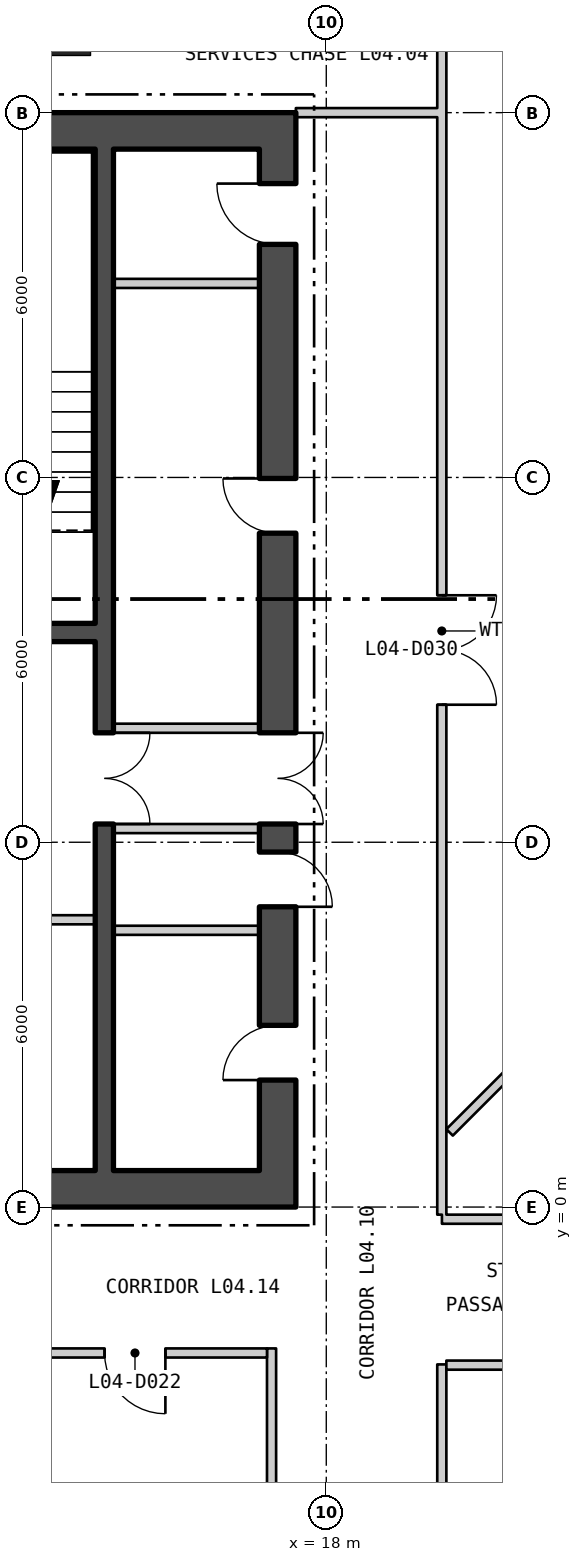
"""IFC4 building model, lengths in metres.
Left out: names, types, materials, properties, quantities, classifications, styles, units other than length and angle.
Written with IfcOpenShell. Run it as: python <this file> out.ifc"""

import sys

from ifc_helpers import new_model, si_unit, direction, frame, frame_2d, origin, origin_2d, place, context, subcontext, project, spatial, rectangle, hollow_rectangle, extrude, element, fill, save


model = new_model("IFC4")
c1 = context("Model", 3, precision=1e-05, world=origin(), true_north=direction((0.0, 1.0)))
c2 = subcontext(c1, "Body", "Model", "MODEL_VIEW")
j1 = project(units=[si_unit("LENGTHUNIT", "METRE"), si_unit("PLANEANGLEUNIT", "RADIAN")], contexts=[c1])
p1 = place(None, origin())
s1 = spatial("IfcSite", under=j1, at=p1, CompositionType="ELEMENT")
p2 = place(p1, origin())
s2 = spatial("IfcBuilding", under=s1, at=p2, CompositionType="ELEMENT")
p3 = place(p2, frame((0.0, 0.0, 23.7)))
s3 = spatial("IfcBuildingStorey", under=s2, at=p3, CompositionType="ELEMENT", Elevation=23.7)
p4 = place(p3, frame((13.523, 19.54, 0.0), z_axis=(0.0, 0.0, 1.0), x_axis=(-1.0, 0.0, 0.0)))
e1 = element("IfcColumn", 1, at=p4, inside=s3, PredefinedType="COLUMN", context=c2, shape_type="SweptSolid", body=[
    extrude(hollow_rectangle(XDim=1.2, YDim=1.2, WallThickness=0.1, at=origin_2d()), origin(), (0.0, 0.0, 1.0), 5.1),
])
p5 = place(p3, frame((-17.5, 0.3, 0.0), z_axis=(0.0, 0.0, 1.0), x_axis=(1.0, 0.0, 0.0)))
e2 = element("IfcWall", 2, at=p5, inside=s3, PredefinedType="SHEAR", context=c2, shape_type="SweptSolid", body=[
    extrude(rectangle(XDim=35.0, YDim=0.6, at=frame_2d((17.5, 0.0))), origin(), (0.0, 0.0, 1.0), 4.85),
])
p6 = place(p5, frame((12.0, 0.0, 0.0)))
e3 = element("IfcOpeningElement", 3, at=p6, cuts=e2, PredefinedType="OPENING", context=c2, shape_type="SweptSolid", body=[
    extrude(rectangle(XDim=1.8, YDim=2.4, at=frame_2d((0.9, 1.2))), frame((0.0, 0.31, 0.0), z_axis=(0.0, -1.0, 0.0), x_axis=(1.0, 0.0, 0.0)), (0.0, 0.0, 1.0), 0.62),
])
p7 = place(p5, frame((22.0, 0.0, 0.0)))
e4 = element("IfcOpeningElement", 4, at=p7, cuts=e2, PredefinedType="OPENING", context=c2, shape_type="SweptSolid", body=[
    extrude(rectangle(XDim=1.8, YDim=2.4, at=frame_2d((0.9, 1.2))), frame((0.0, 0.31, 0.0), z_axis=(0.0, -1.0, 0.0), x_axis=(1.0, 0.0, 0.0)), (0.0, 0.0, 1.0), 0.62),
])
p8 = place(p3, frame((-17.5, 17.7, 0.0), z_axis=(0.0, 0.0, 1.0), x_axis=(1.0, 0.0, 0.0)))
e5 = element("IfcWall", 5, at=p8, inside=s3, PredefinedType="SHEAR", context=c2, shape_type="SweptSolid", body=[
    extrude(rectangle(XDim=35.0, YDim=0.6, at=frame_2d((17.5, 0.0))), origin(), (0.0, 0.0, 1.0), 4.85),
])
p9 = place(p3, frame((17.2, 0.6, 0.0), z_axis=(0.0, 0.0, 1.0), x_axis=(0.0, 1.0, 0.0)))
e6 = element("IfcWall", 6, at=p9, inside=s3, PredefinedType="SHEAR", context=c2, shape_type="SweptSolid", body=[
    extrude(rectangle(XDim=16.8, YDim=0.6, at=frame_2d((8.4, 0.0))), origin(), (0.0, 0.0, 1.0), 4.85),
])
p10 = place(p9, frame((5.7, 0.0, 0.0)))
e7 = element("IfcOpeningElement", 7, at=p10, cuts=e6, PredefinedType="OPENING", context=c2, shape_type="SweptSolid", body=[
    extrude(rectangle(XDim=1.5, YDim=2.1, at=frame_2d((0.75, 1.05))), frame((0.0, 0.31, 0.0), z_axis=(0.0, -1.0, 0.0), x_axis=(1.0, 0.0, 0.0)), (0.0, 0.0, 1.0), 0.62),
])
p11 = place(p9, frame((1.488, 0.0, 0.0)))
e8 = element("IfcOpeningElement", 8, at=p11, cuts=e6, PredefinedType="OPENING", context=c2, shape_type="SweptSolid", body=[
    extrude(rectangle(XDim=0.9, YDim=2.1, at=frame_2d((0.45, 1.05))), frame((0.0, 0.31, 0.0), z_axis=(0.0, -1.0, 0.0), x_axis=(1.0, 0.0, 0.0)), (0.0, 0.0, 1.0), 0.62),
])
p12 = place(p9, frame((4.338, 0.0, 0.0)))
e9 = element("IfcOpeningElement", 9, at=p12, cuts=e6, PredefinedType="OPENING", context=c2, shape_type="SweptSolid", body=[
    extrude(rectangle(XDim=0.9, YDim=2.1, at=frame_2d((0.45, 1.05))), frame((0.0, 0.31, 0.0), z_axis=(0.0, -1.0, 0.0), x_axis=(1.0, 0.0, 0.0)), (0.0, 0.0, 1.0), 0.62),
])
p13 = place(p9, frame((10.483, 0.0, 0.0)))
e10 = element("IfcOpeningElement", 10, at=p13, cuts=e6, PredefinedType="OPENING", context=c2, shape_type="SweptSolid", body=[
    extrude(rectangle(XDim=0.9, YDim=2.1, at=frame_2d((0.45, 1.05))), frame((0.0, 0.31, 0.0), z_axis=(0.0, -1.0, 0.0), x_axis=(1.0, 0.0, 0.0)), (0.0, 0.0, 1.0), 0.62),
])
p14 = place(p9, frame((15.233, 0.0, 0.0)))
e11 = element("IfcOpeningElement", 11, at=p14, cuts=e6, PredefinedType="OPENING", context=c2, shape_type="SweptSolid", body=[
    extrude(rectangle(XDim=1.0, YDim=2.1, at=frame_2d((0.5, 1.05))), frame((0.0, 0.31, 0.0), z_axis=(0.0, -1.0, 0.0), x_axis=(1.0, 0.0, 0.0)), (0.0, 0.0, 1.0), 0.62),
])
p15 = place(p3, frame((14.35, 0.6, 0.0), z_axis=(0.0, 0.0, 1.0), x_axis=(0.0, 1.0, 0.0)))
e12 = element("IfcWall", 12, at=p15, inside=s3, PredefinedType="SHEAR", context=c2, shape_type="SweptSolid", body=[
    extrude(rectangle(XDim=16.8, YDim=0.3, at=frame_2d((8.4, 0.0))), origin(), (0.0, 0.0, 1.0), 4.85),
])
p16 = place(p15, frame((5.7, 0.0, 0.0)))
e13 = element("IfcOpeningElement", 13, at=p16, cuts=e12, PredefinedType="OPENING", context=c2, shape_type="SweptSolid", body=[
    extrude(rectangle(XDim=1.5, YDim=2.1, at=frame_2d((0.75, 1.05))), frame((0.0, 0.16, 0.0), z_axis=(0.0, -1.0, 0.0), x_axis=(1.0, 0.0, 0.0)), (0.0, 0.0, 1.0), 0.32),
])
p17 = place(p3, frame((11.0, 9.45, 0.0), z_axis=(0.0, 0.0, 1.0), x_axis=(1.0, 0.0, 0.0)))
e14 = element("IfcWall", 14, at=p17, inside=s3, PredefinedType="SHEAR", context=c2, shape_type="SweptSolid", body=[
    extrude(rectangle(XDim=3.2, YDim=0.3, at=frame_2d((1.6, 0.0))), origin(), (0.0, 0.0, 1.0), 4.85),
])
p18 = place(p17, frame((1.0, 0.0, 0.0)))
e15 = element("IfcOpeningElement", 15, at=p18, cuts=e14, PredefinedType="OPENING", context=c2, shape_type="SweptSolid", body=[
    extrude(rectangle(XDim=1.2, YDim=2.1, at=frame_2d((0.6, 1.05))), frame((0.0, 0.16, 0.0), z_axis=(0.0, -1.0, 0.0), x_axis=(1.0, 0.0, 0.0)), (0.0, 0.0, 1.0), 0.32),
])
p19 = place(p3, frame((11.0, 4.725, 0.0), z_axis=(0.0, 0.0, 1.0), x_axis=(1.0, 0.0, 0.0)))
e16 = element("IfcWall", 16, at=p19, inside=s3, PredefinedType="PARTITIONING", context=c2, shape_type="SweptSolid", body=[
    extrude(rectangle(XDim=3.2, YDim=0.15, at=frame_2d((1.6, 0.0))), origin(), (0.0, 0.0, 1.0), 4.85),
])
for number, where, z_axis, x_axis in (
    (17, (14.5, 6.225, 0.0), (0.0, 0.0, 1.0), (1.0, 0.0, 0.0)),
    (18, (14.5, 7.875, 0.0), (0.0, 0.0, 1.0), (1.0, 0.0, 0.0)),
    (19, (14.5, 4.552, 0.0), (0.0, 0.0, 1.0), (1.0, 0.0, 0.0)),
    (20, (14.5, 15.191, 0.0), (0.0, 0.0, 1.0), (1.0, 0.0, 0.0)),
):
    element("IfcWall", number, at=place(p3, frame(where, z_axis=z_axis, x_axis=x_axis)), inside=s3, PredefinedType="PARTITIONING", context=c2, shape_type="SweptSolid", body=[
        extrude(rectangle(XDim=2.4, YDim=0.15, at=frame_2d((1.2, 0.0))), origin(), (0.0, 0.0, 1.0), 4.85),
    ])
p20 = place(p3, frame((9.075, -2.4, 0.0), z_axis=(0.0, 0.0, 1.0), x_axis=(1.0, 0.0, 0.0)))
e21 = element("IfcWall", 21, at=p20, inside=s3, PredefinedType="PARTITIONING", context=c2, shape_type="SweptSolid", body=[
    extrude(rectangle(XDim=7.95, YDim=0.15, at=frame_2d((3.975, 0.0))), origin(), (0.0, 0.0, 1.0), 4.85),
])
p21 = place(p20, frame((1.329, 0.0, 0.0)))
e22 = element("IfcOpeningElement", 22, at=p21, cuts=e21, PredefinedType="OPENING", context=c2, shape_type="SweptSolid", body=[
    extrude(rectangle(XDim=1.0, YDim=2.1, at=frame_2d((0.5, 1.05))), frame((0.0, 0.085, 0.0), z_axis=(0.0, -1.0, 0.0), x_axis=(1.0, 0.0, 0.0)), (0.0, 0.0, 1.0), 0.17),
])
p22 = place(p20, frame((5.279, 0.0, 0.0)))
e23 = element("IfcOpeningElement", 23, at=p22, cuts=e21, PredefinedType="OPENING", context=c2, shape_type="SweptSolid", body=[
    extrude(rectangle(XDim=1.0, YDim=2.1, at=frame_2d((0.5, 1.05))), frame((0.0, 0.085, 0.0), z_axis=(0.0, -1.0, 0.0), x_axis=(1.0, 0.0, 0.0)), (0.0, 0.0, 1.0), 0.17),
])
p23 = place(p3, frame((17.1, -21.375, 0.0), z_axis=(0.0, 0.0, 1.0), x_axis=(0.0, 1.0, 0.0)))
e24 = element("IfcWall", 24, at=p23, inside=s3, PredefinedType="PARTITIONING", context=c2, shape_type="SweptSolid", body=[
    extrude(rectangle(XDim=19.05, YDim=0.15, at=frame_2d((9.525, 0.0))), origin(), (0.0, 0.0, 1.0), 4.85),
])
p24 = place(p23, frame((4.963, 0.0, 0.0)))
e25 = element("IfcOpeningElement", 25, at=p24, cuts=e24, PredefinedType="OPENING", context=c2, shape_type="SweptSolid", body=[
    extrude(rectangle(XDim=1.0, YDim=2.1, at=frame_2d((0.5, 1.05))), frame((0.0, 0.085, 0.0), z_axis=(0.0, -1.0, 0.0), x_axis=(1.0, 0.0, 0.0)), (0.0, 0.0, 1.0), 0.17),
])
p25 = place(p3, frame((17.5, 18.0, 0.0), z_axis=(0.0, 0.0, 1.0), x_axis=(1.0, 0.0, 0.0)))
e26 = element("IfcWall", 26, at=p25, inside=s3, PredefinedType="PARTITIONING", context=c2, shape_type="SweptSolid", body=[
    extrude(rectangle(XDim=2.475, YDim=0.15, at=frame_2d((1.238, 0.0))), origin(), (0.0, 0.0, 1.0), 4.3),
])
p26 = place(p3, frame((19.9, -23.775, 0.0), z_axis=(0.0, 0.0, 1.0), x_axis=(0.0, 1.0, 0.0)))
e27 = element("IfcWall", 27, at=p26, inside=s3, PredefinedType="PARTITIONING", context=c2, shape_type="SweptSolid", body=[
    extrude(rectangle(XDim=21.187, YDim=0.15, at=frame_2d((10.594, 0.0))), origin(), (0.0, 0.0, 1.0), 4.85),
])
p27 = place(p26, frame((3.017, 0.0, 0.0)))
e28 = element("IfcOpeningElement", 28, at=p27, cuts=e27, PredefinedType="OPENING", context=c2, shape_type="SweptSolid", body=[
    extrude(rectangle(XDim=1.0, YDim=2.1, at=frame_2d((0.5, 1.05))), frame((0.0, 0.085, 0.0), z_axis=(0.0, -1.0, 0.0), x_axis=(1.0, 0.0, 0.0)), (0.0, 0.0, 1.0), 0.17),
])
p28 = place(p26, frame((12.423, 0.0, 0.0)))
e29 = element("IfcOpeningElement", 29, at=p28, cuts=e27, PredefinedType="OPENING", context=c2, shape_type="SweptSolid", body=[
    extrude(rectangle(XDim=1.0, YDim=2.1, at=frame_2d((0.5, 1.05))), frame((0.0, 0.085, 0.0), z_axis=(0.0, -1.0, 0.0), x_axis=(1.0, 0.0, 0.0)), (0.0, 0.0, 1.0), 0.17),
])
p29 = place(p3, frame((19.9, -0.125, 0.0), z_axis=(0.0, 0.0, 1.0), x_axis=(0.0, 1.0, 0.0)))
e30 = element("IfcWall", 30, at=p29, inside=s3, PredefinedType="PARTITIONING", context=c2, shape_type="SweptSolid", body=[
    extrude(rectangle(XDim=1.15, YDim=0.15, at=frame_2d((0.575, 0.0))), origin(), (0.0, 0.0, 1.0), 4.85),
])
p30 = place(p3, frame((19.9, 1.025, 0.0), z_axis=(0.0, 0.0, 1.0), x_axis=(0.0, 1.0, 0.0)))
e31 = element("IfcWall", 31, at=p30, inside=s3, PredefinedType="PARTITIONING", context=c2, shape_type="SweptSolid", body=[
    extrude(rectangle(XDim=16.9, YDim=0.15, at=frame_2d((8.45, 0.0))), origin(), (0.0, 0.0, 1.0), 4.85),
])
p31 = place(p30, frame((7.237, 0.0, 0.0)))
e32 = element("IfcOpeningElement", 32, at=p31, cuts=e31, PredefinedType="OPENING", context=c2, shape_type="SweptSolid", body=[
    extrude(rectangle(XDim=1.8, YDim=2.1, at=frame_2d((0.9, 1.05))), frame((0.0, 0.085, 0.0), z_axis=(0.0, -1.0, 0.0), x_axis=(1.0, 0.0, 0.0)), (0.0, 0.0, 1.0), 0.17),
])
p32 = place(p3, frame((19.9, 18.075, 0.0), z_axis=(0.0, 0.0, 1.0), x_axis=(0.0, 1.0, 0.0)))
e33 = element("IfcWall", 33, at=p32, inside=s3, PredefinedType="PARTITIONING", context=c2, shape_type="SweptSolid", body=[
    extrude(rectangle(XDim=1.675, YDim=0.15, at=frame_2d((0.838, 0.0))), origin(), (0.0, 0.0, 1.0), 4.85),
])
p33 = place(p3, frame((19.902, -0.2, 0.0), z_axis=(0.0, 0.0, 1.0), x_axis=(1.0, 0.0, 0.0)))
e34 = element("IfcWall", 34, at=p33, inside=s3, PredefinedType="PARTITIONING", context=c2, shape_type="SweptSolid", body=[
    extrude(rectangle(XDim=6.848, YDim=0.15, at=frame_2d((3.424, 0.0))), origin(), (0.0, 0.0, 1.0), 4.85),
])
p34 = place(p33, frame((1.713, 0.0, 0.0)))
e35 = element("IfcOpeningElement", 35, at=p34, cuts=e34, PredefinedType="OPENING", context=c2, shape_type="SweptSolid", body=[
    extrude(rectangle(XDim=1.0, YDim=2.1, at=frame_2d((0.5, 1.05))), frame((0.0, 0.085, 0.0), z_axis=(0.0, -1.0, 0.0), x_axis=(1.0, 0.0, 0.0)), (0.0, 0.0, 1.0), 0.17),
])
p35 = place(p3, frame((19.975, -2.6, 0.0), z_axis=(0.0, 0.0, 1.0), x_axis=(1.0, 0.0, 0.0)))
e36 = element("IfcWall", 36, at=p35, inside=s3, PredefinedType="PARTITIONING", context=c2, shape_type="SweptSolid", body=[
    extrude(rectangle(XDim=3.675, YDim=0.15, at=frame_2d((1.837, 0.0))), origin(), (0.0, 0.0, 1.0), 4.85),
])
p36 = place(p35, frame((1.312, 0.0, 0.0)))
e37 = element("IfcOpeningElement", 37, at=p36, cuts=e36, PredefinedType="OPENING", context=c2, shape_type="SweptSolid", body=[
    extrude(rectangle(XDim=1.0, YDim=2.1, at=frame_2d((0.5, 1.05))), frame((0.0, 0.085, 0.0), z_axis=(0.0, -1.0, 0.0), x_axis=(1.0, 0.0, 0.0)), (0.0, 0.0, 1.0), 0.17),
])
p37 = place(p3, frame((20.028, 1.228, 0.0), z_axis=(0.0, 0.0, 1.0), x_axis=(0.707106781187, 0.707106781187, 0.0)))
e38 = element("IfcWall", 38, at=p37, inside=s3, PredefinedType="PARTITIONING", context=c2, shape_type="SweptSolid", body=[
    extrude(rectangle(XDim=7.586, YDim=0.15, at=frame_2d((3.793, 0.0))), origin(), (0.0, 0.0, 1.0), 4.85),
])
p38 = place(p16, origin())
e39 = element("IfcDoor", 39, at=p38, inside=s3, OperationType="DOUBLE_DOOR_SINGLE_SWING", PredefinedType="DOOR", context=c2, shape_type="SweptSolid", body=[
    extrude(rectangle(XDim=1.5, YDim=2.1, at=frame_2d((0.75, 1.05))), frame((0.0, 0.025, 0.0), z_axis=(0.0, -1.0, 0.0), x_axis=(1.0, 0.0, 0.0)), (0.0, 0.0, 1.0), 0.05),
])
fill(e13, e39)
p39 = place(p10, origin())
e40 = element("IfcDoor", 40, at=p39, inside=s3, OperationType="DOUBLE_DOOR_SINGLE_SWING", PredefinedType="DOOR", context=c2, shape_type="SweptSolid", body=[
    extrude(rectangle(XDim=1.5, YDim=2.1, at=frame_2d((0.75, 1.05))), frame((0.0, 0.025, 0.0), z_axis=(0.0, -1.0, 0.0), x_axis=(1.0, 0.0, 0.0)), (0.0, 0.0, 1.0), 0.05),
])
fill(e7, e40)
p40 = place(p11, origin())
e41 = element("IfcDoor", 41, at=p40, inside=s3, OperationType="SINGLE_SWING_RIGHT", PredefinedType="DOOR", context=c2, shape_type="SweptSolid", body=[
    extrude(rectangle(XDim=0.9, YDim=2.1, at=frame_2d((0.45, 1.05))), frame((0.0, 0.025, 0.0), z_axis=(0.0, -1.0, 0.0), x_axis=(1.0, 0.0, 0.0)), (0.0, 0.0, 1.0), 0.05),
])
fill(e8, e41)
p41 = place(p12, origin())
e42 = element("IfcDoor", 42, at=p41, inside=s3, OperationType="SINGLE_SWING_LEFT", PredefinedType="DOOR", context=c2, shape_type="SweptSolid", body=[
    extrude(rectangle(XDim=0.9, YDim=2.1, at=frame_2d((0.45, 1.05))), frame((0.0, 0.025, 0.0), z_axis=(0.0, -1.0, 0.0), x_axis=(1.0, 0.0, 0.0)), (0.0, 0.0, 1.0), 0.05),
])
fill(e9, e42)
p42 = place(p13, origin())
e43 = element("IfcDoor", 43, at=p42, inside=s3, OperationType="SINGLE_SWING_LEFT", PredefinedType="DOOR", context=c2, shape_type="SweptSolid", body=[
    extrude(rectangle(XDim=0.9, YDim=2.1, at=frame_2d((0.45, 1.05))), frame((0.0, 0.025, 0.0), z_axis=(0.0, -1.0, 0.0), x_axis=(1.0, 0.0, 0.0)), (0.0, 0.0, 1.0), 0.05),
])
fill(e10, e43)
p43 = place(p14, origin())
e44 = element("IfcDoor", 44, at=p43, inside=s3, OperationType="SINGLE_SWING_LEFT", PredefinedType="DOOR", context=c2, shape_type="SweptSolid", body=[
    extrude(rectangle(XDim=1.0, YDim=2.1, at=frame_2d((0.5, 1.05))), frame((0.0, 0.025, 0.0), z_axis=(0.0, -1.0, 0.0), x_axis=(1.0, 0.0, 0.0)), (0.0, 0.0, 1.0), 0.05),
])
fill(e11, e44)
p44 = place(p22, origin())
e45 = element("IfcDoor", 45, at=p44, inside=s3, OperationType="SINGLE_SWING_RIGHT", PredefinedType="DOOR", context=c2, shape_type="SweptSolid", body=[
    extrude(rectangle(XDim=1.0, YDim=2.1, at=frame_2d((0.5, 1.05))), frame((0.0, 0.025, 0.0), z_axis=(0.0, -1.0, 0.0), x_axis=(1.0, 0.0, 0.0)), (0.0, 0.0, 1.0), 0.05),
])
fill(e23, e45)
p45 = place(p31, origin())
e46 = element("IfcDoor", 46, at=p45, inside=s3, OperationType="DOUBLE_DOOR_SINGLE_SWING", PredefinedType="DOOR", context=c2, shape_type="SweptSolid", body=[
    extrude(rectangle(XDim=1.8, YDim=2.1, at=frame_2d((0.9, 1.05))), frame((0.0, 0.025, 0.0), z_axis=(0.0, -1.0, 0.0), x_axis=(1.0, 0.0, 0.0)), (0.0, 0.0, 1.0), 0.05),
])
fill(e32, e46)
save(model, sys.argv[1])
